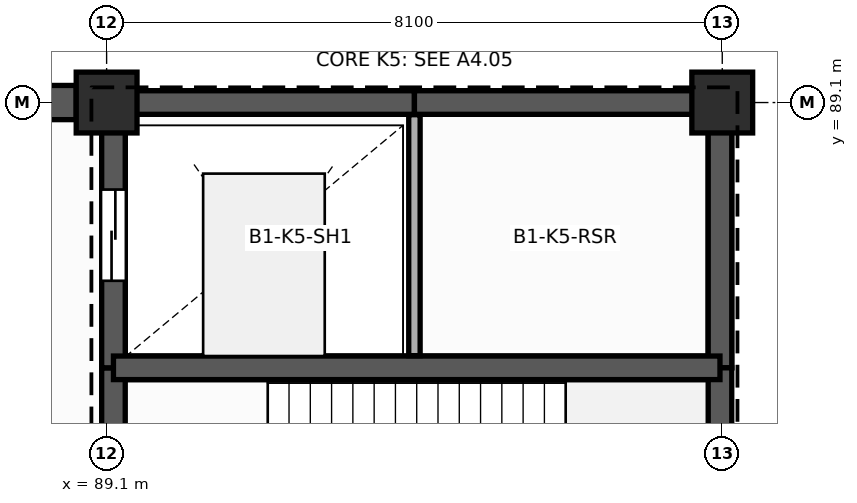
"""IFC4 building model, lengths in metres.
Left out: names, types, materials, properties, quantities, classifications, styles, units other than length and angle.
Written with IfcOpenShell. Run it as: python <this file> out.ifc"""

import sys

from ifc_helpers import new_model, si_unit, direction, frame, frame_2d, origin, origin_2d, place, context, subcontext, project, spatial, rectangle, extrude, element, fill, save


model = new_model("IFC4")
c1 = context("Model", 3, precision=1e-05, world=origin(), true_north=direction((0.0, 1.0)))
c2 = subcontext(c1, "Body", "Model", "MODEL_VIEW")
j1 = project(units=[si_unit("LENGTHUNIT", "METRE"), si_unit("PLANEANGLEUNIT", "RADIAN")], contexts=[c1])
p1 = place(None, origin())
s1 = spatial("IfcSite", under=j1, at=p1, CompositionType="ELEMENT")
p2 = place(p1, origin())
s2 = spatial("IfcBuilding", under=s1, at=p2, CompositionType="ELEMENT")
p3 = place(p2, frame((0.0, 0.0, -5.4)))
s3 = spatial("IfcBuildingStorey", under=s2, at=p3, CompositionType="ELEMENT", Elevation=-5.4)
for number, where, z_axis, x_axis in (
    (1, (89.1, 89.1, -0.4), (0.0, 0.0, 1.0), (1.0, 0.0, 0.0)),
    (2, (97.2, 89.1, -0.4), (0.0, 0.0, 1.0), (1.0, 0.0, 0.0)),
):
    element("IfcColumn", number, at=place(p3, frame(where, z_axis=z_axis, x_axis=x_axis)), inside=s3, PredefinedType="COLUMN", context=c2, shape_type="SweptSolid", body=[
        extrude(rectangle(XDim=0.8, YDim=0.8, at=origin_2d()), origin(), (0.0, 0.0, 1.0), 5.8),
    ])
p4 = place(p3, frame((88.7, 89.1, 0.0), z_axis=(0.0, 0.0, 1.0), x_axis=(-1.0, 0.0, 0.0)))
e3 = element("IfcWall", 3, at=p4, inside=s3, PredefinedType="USERDEFINED", context=c2, shape_type="SweptSolid", body=[
    extrude(rectangle(XDim=4.5, YDim=0.45, at=frame_2d((2.25, 0.0))), origin(), (0.0, 0.0, 1.0), 5.1),
])
p5 = place(p3, frame((89.19, 85.61, -1.35), z_axis=(0.0, 0.0, 1.0), x_axis=(1.0, 0.0, 0.0)))
e4 = element("IfcWall", 4, at=p5, inside=s3, PredefinedType="SHEAR", context=c2, shape_type="SweptSolid", body=[
    extrude(rectangle(XDim=7.98, YDim=0.31, at=frame_2d((3.99, 0.0))), origin(), (0.0, 0.0, 1.0), 0.95),
])
p6 = place(p3, frame((97.17, 85.61, -1.35), z_axis=(0.0, 0.0, 1.0), x_axis=(0.0, 1.0, 0.0)))
e5 = element("IfcWall", 5, at=p6, inside=s3, PredefinedType="SHEAR", context=c2, shape_type="SweptSolid", body=[
    extrude(rectangle(XDim=3.49, YDim=0.31, at=frame_2d((1.745, 0.0))), origin(), (0.0, 0.0, 1.0), 0.95),
])
p7 = place(p3, frame((97.17, 89.1, -1.35), z_axis=(0.0, 0.0, 1.0), x_axis=(-1.0, 0.0, 0.0)))
e6 = element("IfcWall", 6, at=p7, inside=s3, PredefinedType="SHEAR", context=c2, shape_type="SweptSolid", body=[
    extrude(rectangle(XDim=7.98, YDim=0.31, at=frame_2d((3.99, 0.0))), origin(), (0.0, 0.0, 1.0), 0.95),
])
p8 = place(p3, frame((89.19, 89.1, -1.35), z_axis=(0.0, 0.0, 1.0), x_axis=(0.0, -1.0, 0.0)))
e7 = element("IfcWall", 7, at=p8, inside=s3, PredefinedType="SHEAR", context=c2, shape_type="SweptSolid", body=[
    extrude(rectangle(XDim=3.49, YDim=0.31, at=frame_2d((1.745, 0.0))), origin(), (0.0, 0.0, 1.0), 0.95),
])
p9 = place(p3, frame((89.19, 81.25, -0.4), z_axis=(0.0, 0.0, 1.0), x_axis=(0.0, 1.0, 0.0)))
e8 = element("IfcWall", 8, at=p9, inside=s3, PredefinedType="SHEAR", context=c2, shape_type="SweptSolid", body=[
    extrude(rectangle(XDim=4.36, YDim=0.31, at=frame_2d((2.18, 0.0))), origin(), (0.0, 0.0, 1.0), 5.8),
])
p10 = place(p9, frame((1.35, 0.0, 0.4)))
e9 = element("IfcOpeningElement", 9, at=p10, cuts=e8, PredefinedType="OPENING", context=c2, shape_type="SweptSolid", body=[
    extrude(rectangle(XDim=1.2, YDim=2.25, at=frame_2d((0.6, 1.125))), frame((0.0, 0.165, 0.0), z_axis=(0.0, -1.0, 0.0), x_axis=(1.0, 0.0, 0.0)), (0.0, 0.0, 1.0), 0.33),
])
p11 = place(p3, frame((89.19, 85.61, -0.4), z_axis=(0.0, 0.0, 1.0), x_axis=(0.0, 1.0, 0.0)))
e10 = element("IfcWall", 10, at=p11, inside=s3, PredefinedType="SHEAR", context=c2, shape_type="SweptSolid", body=[
    extrude(rectangle(XDim=3.49, YDim=0.31, at=frame_2d((1.745, 0.0))), origin(), (0.0, 0.0, 1.0), 5.8),
])
p12 = place(p11, frame((1.145, 0.0, 0.4)))
e11 = element("IfcOpeningElement", 11, at=p12, cuts=e10, PredefinedType="OPENING", context=c2, shape_type="SweptSolid", body=[
    extrude(rectangle(XDim=1.2, YDim=2.2, at=frame_2d((0.6, 1.1))), frame((0.0, 0.165, 0.0), z_axis=(0.0, -1.0, 0.0), x_axis=(1.0, 0.0, 0.0)), (0.0, 0.0, 1.0), 0.33),
])
p13 = place(p3, frame((89.19, 89.1, -0.4), z_axis=(0.0, 0.0, 1.0), x_axis=(1.0, 0.0, 0.0)))
e12 = element("IfcWall", 12, at=p13, inside=s3, PredefinedType="SHEAR", context=c2, shape_type="SweptSolid", body=[
    extrude(rectangle(XDim=3.96, YDim=0.31, at=frame_2d((1.98, 0.0))), origin(), (0.0, 0.0, 1.0), 5.8),
])
p14 = place(p3, frame((93.15, 89.1, -0.4), z_axis=(0.0, 0.0, 1.0), x_axis=(1.0, 0.0, 0.0)))
e13 = element("IfcWall", 13, at=p14, inside=s3, PredefinedType="SHEAR", context=c2, shape_type="SweptSolid", body=[
    extrude(rectangle(XDim=4.02, YDim=0.31, at=frame_2d((2.01, 0.0))), origin(), (0.0, 0.0, 1.0), 5.8),
])
p15 = place(p3, frame((97.17, 89.1, -0.4), z_axis=(0.0, 0.0, 1.0), x_axis=(0.0, -1.0, 0.0)))
e14 = element("IfcWall", 14, at=p15, inside=s3, PredefinedType="SHEAR", context=c2, shape_type="SweptSolid", body=[
    extrude(rectangle(XDim=3.49, YDim=0.31, at=frame_2d((1.745, 0.0))), origin(), (0.0, 0.0, 1.0), 5.8),
])
p16 = place(p3, frame((97.17, 85.61, -0.4), z_axis=(0.0, 0.0, 1.0), x_axis=(0.0, -1.0, 0.0)))
e15 = element("IfcWall", 15, at=p16, inside=s3, PredefinedType="SHEAR", context=c2, shape_type="SweptSolid", body=[
    extrude(rectangle(XDim=4.36, YDim=0.31, at=frame_2d((2.18, 0.0))), origin(), (0.0, 0.0, 1.0), 5.8),
])
p17 = place(p3, frame((89.19, 85.61, -0.4), z_axis=(0.0, 0.0, 1.0), x_axis=(1.0, 0.0, 0.0)))
e16 = element("IfcWall", 16, at=p17, inside=s3, PredefinedType="SHEAR", context=c2, shape_type="SweptSolid", body=[
    extrude(rectangle(XDim=7.98, YDim=0.31, at=frame_2d((3.99, 0.0))), origin(), (0.0, 0.0, 1.0), 5.8),
])
p18 = place(p3, frame((93.15, 85.77, 0.0), z_axis=(0.0, 0.0, 1.0), x_axis=(0.0, 1.0, 0.0)))
e17 = element("IfcWall", 17, at=p18, inside=s3, PredefinedType="PLUMBINGWALL", context=c2, shape_type="SweptSolid", body=[
    extrude(rectangle(XDim=3.17, YDim=0.15, at=frame_2d((1.585, 0.0))), origin(), (0.0, 0.0, 1.0), 5.05),
])
p19 = place(p12, origin())
e18 = element("IfcDoor", 18, at=p19, inside=s3, OperationType="SLIDING_TO_LEFT", PredefinedType="DOOR", context=c2, shape_type="SweptSolid", body=[
    extrude(rectangle(XDim=1.2, YDim=2.2, at=frame_2d((0.6, 1.1))), frame((0.0, 0.025, 0.0), z_axis=(0.0, -1.0, 0.0), x_axis=(1.0, 0.0, 0.0)), (0.0, 0.0, 1.0), 0.05),
])
fill(e11, e18)
save(model, sys.argv[1])
